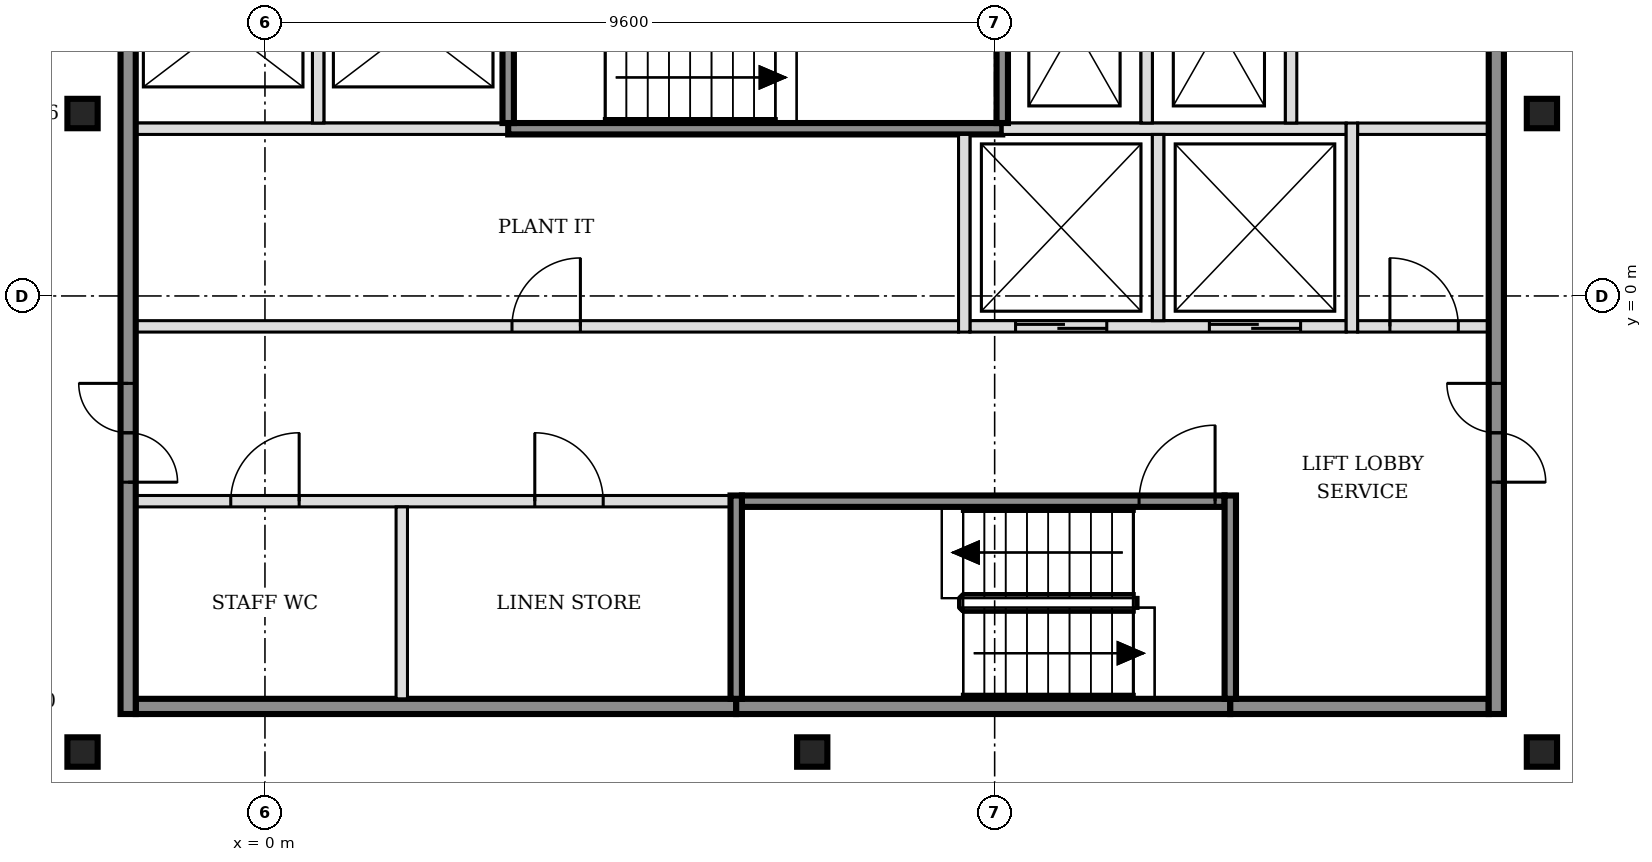
"""IFC4 building model, lengths in metres.
Left out: names, types, materials, properties, quantities, classifications, styles, units other than length and angle.
Written with IfcOpenShell. Run it as: python <this file> out.ifc"""

import sys

from ifc_helpers import new_model, si_unit, direction, frame, frame_2d, origin, origin_2d, place, context, subcontext, project, spatial, rectangle, i_section, extrude, element, fill, save


model = new_model("IFC4")
c1 = context("Model", 3, precision=1e-05, world=origin(), true_north=direction((0.0, 1.0)))
c2 = subcontext(c1, "Body", "Model", "MODEL_VIEW")
j1 = project(units=[si_unit("LENGTHUNIT", "METRE"), si_unit("PLANEANGLEUNIT", "RADIAN")], contexts=[c1])
p1 = place(None, origin())
s1 = spatial("IfcSite", under=j1, at=p1, CompositionType="ELEMENT")
p2 = place(p1, origin())
s2 = spatial("IfcBuilding", under=s1, at=p2, CompositionType="ELEMENT")
p3 = place(p2, frame((0.0, 0.0, 261.0)))
s3 = spatial("IfcBuildingStorey", under=s2, at=p3, CompositionType="ELEMENT", Elevation=261.0)
for number, where, z_axis, x_axis in (
    (1, (-2.4, -6.0, -0.25), (0.0, 0.0, 1.0), (1.0, 0.0, 0.0)),
    (2, (7.2, -6.0, -0.25), (0.0, 0.0, 1.0), (1.0, 0.0, 0.0)),
    (3, (16.8, -6.0, -0.25), (0.0, 0.0, 1.0), (1.0, 0.0, 0.0)),
    (4, (-2.4, 2.4, -0.25), (0.0, 0.0, 1.0), (1.0, 0.0, 0.0)),
    (5, (16.8, 2.4, -0.25), (0.0, 0.0, 1.0), (1.0, 0.0, 0.0)),
):
    element("IfcColumn", number, at=place(p3, frame(where, z_axis=z_axis, x_axis=x_axis)), inside=s3, PredefinedType="COLUMN", context=c2, shape_type="SweptSolid", body=[
        extrude(i_section(OverallWidth=0.398, OverallDepth=0.387, WebThickness=0.021, FlangeThickness=0.033, FilletRadius=0.015, at=origin_2d()), origin(), (0.0, 0.0, 1.0), 6.1),
    ])
p4 = place(p3, frame((-1.7, -5.4, 0.0), z_axis=(0.0, 0.0, 1.0), x_axis=(1.0, 0.0, 0.0)))
e6 = element("IfcWall", 6, at=p4, inside=s3, PredefinedType="SOLIDWALL", context=c2, shape_type="SweptSolid", body=[
    extrude(rectangle(XDim=7.9, YDim=0.2, at=frame_2d((3.95, 0.0))), origin(), (0.0, 0.0, 1.0), 5.85),
])
p5 = place(p3, frame((6.2, -5.4, 0.0), z_axis=(0.0, 0.0, 1.0), x_axis=(1.0, 0.0, 0.0)))
e7 = element("IfcWall", 7, at=p5, inside=s3, PredefinedType="SOLIDWALL", context=c2, shape_type="SweptSolid", body=[
    extrude(rectangle(XDim=6.5, YDim=0.2, at=frame_2d((3.25, 0.0))), origin(), (0.0, 0.0, 1.0), 5.85),
])
p6 = place(p3, frame((12.7, -5.4, 0.0), z_axis=(0.0, 0.0, 1.0), x_axis=(1.0, 0.0, 0.0)))
e8 = element("IfcWall", 8, at=p6, inside=s3, PredefinedType="SOLIDWALL", context=c2, shape_type="SweptSolid", body=[
    extrude(rectangle(XDim=3.4, YDim=0.2, at=frame_2d((1.7, 0.0))), origin(), (0.0, 0.0, 1.0), 5.85),
])
p7 = place(p3, frame((-1.7, -2.7, 0.0), z_axis=(0.0, 0.0, 1.0), x_axis=(1.0, 0.0, 0.0)))
e9 = element("IfcWall", 9, at=p7, inside=s3, PredefinedType="PARTITIONING", context=c2, shape_type="SweptSolid", body=[
    extrude(rectangle(XDim=7.825, YDim=0.15, at=frame_2d((3.913, 0.0))), origin(), (0.0, 0.0, 1.0), 5.85),
])
p8 = place(p7, frame((1.25, 0.0, 0.0)))
e10 = element("IfcOpeningElement", 10, at=p8, cuts=e9, PredefinedType="OPENING", context=c2, shape_type="SweptSolid", body=[
    extrude(rectangle(XDim=0.9, YDim=2.1, at=frame_2d((0.45, 1.05))), frame((0.0, 0.085, 0.0), z_axis=(0.0, -1.0, 0.0), x_axis=(1.0, 0.0, 0.0)), (0.0, 0.0, 1.0), 0.17),
])
p9 = place(p7, frame((5.25, 0.0, 0.0)))
e11 = element("IfcOpeningElement", 11, at=p9, cuts=e9, PredefinedType="OPENING", context=c2, shape_type="SweptSolid", body=[
    extrude(rectangle(XDim=0.9, YDim=2.1, at=frame_2d((0.45, 1.05))), frame((0.0, 0.085, 0.0), z_axis=(0.0, -1.0, 0.0), x_axis=(1.0, 0.0, 0.0)), (0.0, 0.0, 1.0), 0.17),
])
p10 = place(p3, frame((6.275, -2.7, 0.0), z_axis=(0.0, 0.0, 1.0), x_axis=(1.0, 0.0, 0.0)))
e12 = element("IfcWall", 12, at=p10, inside=s3, PredefinedType="SOLIDWALL", context=c2, shape_type="SweptSolid", body=[
    extrude(rectangle(XDim=6.35, YDim=0.15, at=frame_2d((3.175, 0.0))), origin(), (0.0, 0.0, 1.0), 5.85),
])
p11 = place(p10, frame((5.225, 0.0, 0.0)))
e13 = element("IfcOpeningElement", 13, at=p11, cuts=e12, PredefinedType="OPENING", context=c2, shape_type="SweptSolid", body=[
    extrude(rectangle(XDim=1.0, YDim=2.1, at=frame_2d((0.5, 1.05))), frame((0.0, 0.085, 0.0), z_axis=(0.0, -1.0, 0.0), x_axis=(1.0, 0.0, 0.0)), (0.0, 0.0, 1.0), 0.17),
])
p12 = place(p3, frame((-1.7, -0.4, 0.0), z_axis=(0.0, 0.0, 1.0), x_axis=(1.0, 0.0, 0.0)))
e14 = element("IfcWall", 14, at=p12, inside=s3, PredefinedType="PARTITIONING", context=c2, shape_type="SweptSolid", body=[
    extrude(rectangle(XDim=10.825, YDim=0.15, at=frame_2d((5.413, 0.0))), origin(), (0.0, 0.0, 1.0), 5.85),
])
p13 = place(p12, frame((4.95, 0.0, 0.0)))
e15 = element("IfcOpeningElement", 15, at=p13, cuts=e14, PredefinedType="OPENING", context=c2, shape_type="SweptSolid", body=[
    extrude(rectangle(XDim=0.9, YDim=2.1, at=frame_2d((0.45, 1.05))), frame((0.0, 0.085, 0.0), z_axis=(0.0, -1.0, 0.0), x_axis=(1.0, 0.0, 0.0)), (0.0, 0.0, 1.0), 0.17),
])
p14 = place(p3, frame((9.275, -0.4, 0.0), z_axis=(0.0, 0.0, 1.0), x_axis=(1.0, 0.0, 0.0)))
e16 = element("IfcWall", 16, at=p14, inside=s3, PredefinedType="SOLIDWALL", context=c2, shape_type="SweptSolid", body=[
    extrude(rectangle(XDim=4.95, YDim=0.15, at=frame_2d((2.475, 0.0))), origin(), (0.0, 0.0, 1.0), 5.85),
])
p15 = place(p14, frame((0.6, 0.0, 0.0)))
e17 = element("IfcOpeningElement", 17, at=p15, cuts=e16, PredefinedType="OPENING", context=c2, shape_type="SweptSolid", body=[
    extrude(rectangle(XDim=1.2, YDim=2.1, at=frame_2d((0.6, 1.05))), frame((0.0, 0.085, 0.0), z_axis=(0.0, -1.0, 0.0), x_axis=(1.0, 0.0, 0.0)), (0.0, 0.0, 1.0), 0.17),
])
p16 = place(p14, frame((3.15, 0.0, 0.0)))
e18 = element("IfcOpeningElement", 18, at=p16, cuts=e16, PredefinedType="OPENING", context=c2, shape_type="SweptSolid", body=[
    extrude(rectangle(XDim=1.2, YDim=2.1, at=frame_2d((0.6, 1.05))), frame((0.0, 0.085, 0.0), z_axis=(0.0, -1.0, 0.0), x_axis=(1.0, 0.0, 0.0)), (0.0, 0.0, 1.0), 0.17),
])
p17 = place(p3, frame((14.375, -0.4, 0.0), z_axis=(0.0, 0.0, 1.0), x_axis=(1.0, 0.0, 0.0)))
e19 = element("IfcWall", 19, at=p17, inside=s3, PredefinedType="PARTITIONING", context=c2, shape_type="SweptSolid", body=[
    extrude(rectangle(XDim=1.725, YDim=0.15, at=frame_2d((0.863, 0.0))), origin(), (0.0, 0.0, 1.0), 5.85),
])
p18 = place(p17, frame((0.425, 0.0, 0.0)))
e20 = element("IfcOpeningElement", 20, at=p18, cuts=e19, PredefinedType="OPENING", context=c2, shape_type="SweptSolid", body=[
    extrude(rectangle(XDim=0.9, YDim=2.1, at=frame_2d((0.45, 1.05))), frame((0.0, 0.085, 0.0), z_axis=(0.0, -1.0, 0.0), x_axis=(1.0, 0.0, 0.0)), (0.0, 0.0, 1.0), 0.17),
])
p19 = place(p3, frame((-1.7, 2.2, 0.0), z_axis=(0.0, 0.0, 1.0), x_axis=(1.0, 0.0, 0.0)))
e21 = element("IfcWall", 21, at=p19, inside=s3, PredefinedType="SOLIDWALL", context=c2, shape_type="SweptSolid", body=[
    extrude(rectangle(XDim=4.9, YDim=0.15, at=frame_2d((2.45, 0.0))), origin(), (0.0, 0.0, 1.0), 5.85),
])
p20 = place(p3, frame((3.2, 2.2, 0.0), z_axis=(0.0, 0.0, 1.0), x_axis=(1.0, 0.0, 0.0)))
e22 = element("IfcWall", 22, at=p20, inside=s3, PredefinedType="SOLIDWALL", context=c2, shape_type="SweptSolid", body=[
    extrude(rectangle(XDim=6.5, YDim=0.15, at=frame_2d((3.25, 0.0))), origin(), (0.0, 0.0, 1.0), 5.85),
])
p21 = place(p3, frame((9.7, 2.2, 0.0), z_axis=(0.0, 0.0, 1.0), x_axis=(1.0, 0.0, 0.0)))
e23 = element("IfcWall", 23, at=p21, inside=s3, PredefinedType="SOLIDWALL", context=c2, shape_type="SweptSolid", body=[
    extrude(rectangle(XDim=4.525, YDim=0.15, at=frame_2d((2.263, 0.0))), origin(), (0.0, 0.0, 1.0), 5.85),
])
p22 = place(p3, frame((14.375, 2.2, 0.0), z_axis=(0.0, 0.0, 1.0), x_axis=(1.0, 0.0, 0.0)))
e24 = element("IfcWall", 24, at=p22, inside=s3, PredefinedType="PARTITIONING", context=c2, shape_type="SweptSolid", body=[
    extrude(rectangle(XDim=1.725, YDim=0.15, at=frame_2d((0.863, 0.0))), origin(), (0.0, 0.0, 1.0), 5.85),
])
p23 = place(p3, frame((-1.8, -5.5, 0.0), z_axis=(0.0, 0.0, 1.0), x_axis=(0.0, 1.0, 0.0)))
e25 = element("IfcWall", 25, at=p23, inside=s3, PredefinedType="SOLIDWALL", context=c2, shape_type="SweptSolid", body=[
    extrude(rectangle(XDim=15.8, YDim=0.2, at=frame_2d((7.9, 0.0))), origin(), (0.0, 0.0, 1.0), 5.85),
])
p24 = place(p23, frame((3.05, 0.0, 0.0)))
e26 = element("IfcOpeningElement", 26, at=p24, cuts=e25, PredefinedType="OPENING", context=c2, shape_type="SweptSolid", body=[
    extrude(rectangle(XDim=1.3, YDim=2.1, at=frame_2d((0.65, 1.05))), frame((0.0, 0.11, 0.0), z_axis=(0.0, -1.0, 0.0), x_axis=(1.0, 0.0, 0.0)), (0.0, 0.0, 1.0), 0.22),
])
p25 = place(p23, frame((11.45, 0.0, 0.0)))
e27 = element("IfcOpeningElement", 27, at=p25, cuts=e25, PredefinedType="OPENING", context=c2, shape_type="SweptSolid", body=[
    extrude(rectangle(XDim=1.3, YDim=2.1, at=frame_2d((0.65, 1.05))), frame((0.0, 0.11, 0.0), z_axis=(0.0, -1.0, 0.0), x_axis=(1.0, 0.0, 0.0)), (0.0, 0.0, 1.0), 0.22),
])
p26 = place(p3, frame((0.7, 2.275, 0.0), z_axis=(0.0, 0.0, 1.0), x_axis=(0.0, 1.0, 0.0)))
e28 = element("IfcWall", 28, at=p26, inside=s3, PredefinedType="SOLIDWALL", context=c2, shape_type="SweptSolid", body=[
    extrude(rectangle(XDim=2.55, YDim=0.15, at=frame_2d((1.275, 0.0))), origin(), (0.0, 0.0, 1.0), 5.85),
])
p27 = place(p3, frame((1.8, -5.3, 0.0), z_axis=(0.0, 0.0, 1.0), x_axis=(0.0, 1.0, 0.0)))
e29 = element("IfcWall", 29, at=p27, inside=s3, PredefinedType="PARTITIONING", context=c2, shape_type="SweptSolid", body=[
    extrude(rectangle(XDim=2.525, YDim=0.15, at=frame_2d((1.263, 0.0))), origin(), (0.0, 0.0, 1.0), 5.85),
])
p28 = place(p3, frame((3.2, 2.275, 0.0), z_axis=(0.0, 0.0, 1.0), x_axis=(0.0, 1.0, 0.0)))
e30 = element("IfcWall", 30, at=p28, inside=s3, PredefinedType="SOLIDWALL", context=c2, shape_type="SweptSolid", body=[
    extrude(rectangle(XDim=2.55, YDim=0.15, at=frame_2d((1.275, 0.0))), origin(), (0.0, 0.0, 1.0), 5.85),
])
p29 = place(p3, frame((6.2, -5.3, 0.0), z_axis=(0.0, 0.0, 1.0), x_axis=(0.0, 1.0, 0.0)))
e31 = element("IfcWall", 31, at=p29, inside=s3, PredefinedType="SOLIDWALL", context=c2, shape_type="SweptSolid", body=[
    extrude(rectangle(XDim=2.675, YDim=0.15, at=frame_2d((1.337, 0.0))), origin(), (0.0, 0.0, 1.0), 5.85),
])
p30 = place(p3, frame((9.2, -0.475, 0.0), z_axis=(0.0, 0.0, 1.0), x_axis=(0.0, 1.0, 0.0)))
e32 = element("IfcWall", 32, at=p30, inside=s3, PredefinedType="SOLIDWALL", context=c2, shape_type="SweptSolid", body=[
    extrude(rectangle(XDim=2.6, YDim=0.15, at=frame_2d((1.3, 0.0))), origin(), (0.0, 0.0, 1.0), 5.85),
])
for number, where, z_axis, x_axis in (
    (33, (9.7, 2.275, 0.0), (0.0, 0.0, 1.0), (0.0, 1.0, 0.0)),
    (34, (11.6, 2.275, 0.0), (0.0, 0.0, 1.0), (0.0, 1.0, 0.0)),
):
    element("IfcWall", number, at=place(p3, frame(where, z_axis=z_axis, x_axis=x_axis)), inside=s3, PredefinedType="SOLIDWALL", context=c2, shape_type="SweptSolid", body=[
        extrude(rectangle(XDim=2.55, YDim=0.15, at=frame_2d((1.275, 0.0))), origin(), (0.0, 0.0, 1.0), 5.85),
    ])
p31 = place(p3, frame((11.75, -0.325, 0.0), z_axis=(0.0, 0.0, 1.0), x_axis=(0.0, 1.0, 0.0)))
e35 = element("IfcWall", 35, at=p31, inside=s3, PredefinedType="SOLIDWALL", context=c2, shape_type="SweptSolid", body=[
    extrude(rectangle(XDim=2.45, YDim=0.15, at=frame_2d((1.225, 0.0))), origin(), (0.0, 0.0, 1.0), 5.85),
])
p32 = place(p3, frame((12.7, -5.3, 0.0), z_axis=(0.0, 0.0, 1.0), x_axis=(0.0, 1.0, 0.0)))
e36 = element("IfcWall", 36, at=p32, inside=s3, PredefinedType="SOLIDWALL", context=c2, shape_type="SweptSolid", body=[
    extrude(rectangle(XDim=2.675, YDim=0.15, at=frame_2d((1.337, 0.0))), origin(), (0.0, 0.0, 1.0), 5.85),
])
p33 = place(p3, frame((13.5, 2.275, 0.0), z_axis=(0.0, 0.0, 1.0), x_axis=(0.0, 1.0, 0.0)))
e37 = element("IfcWall", 37, at=p33, inside=s3, PredefinedType="SOLIDWALL", context=c2, shape_type="SweptSolid", body=[
    extrude(rectangle(XDim=2.55, YDim=0.15, at=frame_2d((1.275, 0.0))), origin(), (0.0, 0.0, 1.0), 5.85),
])
p34 = place(p3, frame((14.3, -0.475, 0.0), z_axis=(0.0, 0.0, 1.0), x_axis=(0.0, 1.0, 0.0)))
e38 = element("IfcWall", 38, at=p34, inside=s3, PredefinedType="SOLIDWALL", context=c2, shape_type="SweptSolid", body=[
    extrude(rectangle(XDim=2.75, YDim=0.15, at=frame_2d((1.375, 0.0))), origin(), (0.0, 0.0, 1.0), 5.85),
])
p35 = place(p3, frame((16.2, -5.5, 0.0), z_axis=(0.0, 0.0, 1.0), x_axis=(0.0, 1.0, 0.0)))
e39 = element("IfcWall", 39, at=p35, inside=s3, PredefinedType="SOLIDWALL", context=c2, shape_type="SweptSolid", body=[
    extrude(rectangle(XDim=15.8, YDim=0.2, at=frame_2d((7.9, 0.0))), origin(), (0.0, 0.0, 1.0), 5.85),
])
p36 = place(p35, frame((3.05, 0.0, 0.0)))
e40 = element("IfcOpeningElement", 40, at=p36, cuts=e39, PredefinedType="OPENING", context=c2, shape_type="SweptSolid", body=[
    extrude(rectangle(XDim=1.3, YDim=2.1, at=frame_2d((0.65, 1.05))), frame((0.0, 0.11, 0.0), z_axis=(0.0, -1.0, 0.0), x_axis=(1.0, 0.0, 0.0)), (0.0, 0.0, 1.0), 0.22),
])
p37 = place(p35, frame((11.45, 0.0, 0.0)))
e41 = element("IfcOpeningElement", 41, at=p37, cuts=e39, PredefinedType="OPENING", context=c2, shape_type="SweptSolid", body=[
    extrude(rectangle(XDim=1.3, YDim=2.1, at=frame_2d((0.65, 1.05))), frame((0.0, 0.11, 0.0), z_axis=(0.0, -1.0, 0.0), x_axis=(1.0, 0.0, 0.0)), (0.0, 0.0, 1.0), 0.22),
])
p38 = place(p15, origin())
e42 = element("IfcDoor", 42, at=p38, inside=s3, OperationType="DOUBLE_DOOR_SLIDING", PredefinedType="DOOR", context=c2, shape_type="SweptSolid", body=[
    extrude(rectangle(XDim=1.2, YDim=2.1, at=frame_2d((0.6, 1.05))), frame((0.0, 0.025, 0.0), z_axis=(0.0, -1.0, 0.0), x_axis=(1.0, 0.0, 0.0)), (0.0, 0.0, 1.0), 0.05),
])
fill(e17, e42)
p39 = place(p16, origin())
e43 = element("IfcDoor", 43, at=p39, inside=s3, OperationType="DOUBLE_DOOR_SLIDING", PredefinedType="DOOR", context=c2, shape_type="SweptSolid", body=[
    extrude(rectangle(XDim=1.2, YDim=2.1, at=frame_2d((0.6, 1.05))), frame((0.0, 0.025, 0.0), z_axis=(0.0, -1.0, 0.0), x_axis=(1.0, 0.0, 0.0)), (0.0, 0.0, 1.0), 0.05),
])
fill(e18, e43)
p40 = place(p11, origin())
e44 = element("IfcDoor", 44, at=p40, inside=s3, OperationType="SINGLE_SWING_RIGHT", PredefinedType="DOOR", context=c2, shape_type="SweptSolid", body=[
    extrude(rectangle(XDim=1.0, YDim=2.1, at=frame_2d((0.5, 1.05))), frame((0.0, 0.025, 0.0), z_axis=(0.0, -1.0, 0.0), x_axis=(1.0, 0.0, 0.0)), (0.0, 0.0, 1.0), 0.05),
])
fill(e13, e44)
p41 = place(p24, origin())
e45 = element("IfcDoor", 45, at=p41, inside=s3, OperationType="DOUBLE_DOOR_SINGLE_SWING", PredefinedType="DOOR", context=c2, shape_type="SweptSolid", body=[
    extrude(rectangle(XDim=1.3, YDim=2.1, at=frame_2d((0.65, 1.05))), frame((0.0, 0.025, 0.0), z_axis=(0.0, -1.0, 0.0), x_axis=(1.0, 0.0, 0.0)), (0.0, 0.0, 1.0), 0.05),
])
fill(e26, e45)
p42 = place(p36, origin())
e46 = element("IfcDoor", 46, at=p42, inside=s3, OperationType="DOUBLE_DOOR_SINGLE_SWING", PredefinedType="DOOR", context=c2, shape_type="SweptSolid", body=[
    extrude(rectangle(XDim=1.3, YDim=2.1, at=frame_2d((0.65, 1.05))), frame((0.0, 0.025, 0.0), z_axis=(0.0, -1.0, 0.0), x_axis=(1.0, 0.0, 0.0)), (0.0, 0.0, 1.0), 0.05),
])
fill(e40, e46)
p43 = place(p18, origin())
e47 = element("IfcDoor", 47, at=p43, inside=s3, OperationType="SINGLE_SWING_LEFT", PredefinedType="DOOR", context=c2, shape_type="SweptSolid", body=[
    extrude(rectangle(XDim=0.9, YDim=2.1, at=frame_2d((0.45, 1.05))), frame((0.0, 0.025, 0.0), z_axis=(0.0, -1.0, 0.0), x_axis=(1.0, 0.0, 0.0)), (0.0, 0.0, 1.0), 0.05),
])
fill(e20, e47)
p44 = place(p8, origin())
e48 = element("IfcDoor", 48, at=p44, inside=s3, OperationType="SINGLE_SWING_RIGHT", PredefinedType="DOOR", context=c2, shape_type="SweptSolid", body=[
    extrude(rectangle(XDim=0.9, YDim=2.1, at=frame_2d((0.45, 1.05))), frame((0.0, 0.025, 0.0), z_axis=(0.0, -1.0, 0.0), x_axis=(1.0, 0.0, 0.0)), (0.0, 0.0, 1.0), 0.05),
])
fill(e10, e48)
p45 = place(p9, origin())
e49 = element("IfcDoor", 49, at=p45, inside=s3, OperationType="SINGLE_SWING_LEFT", PredefinedType="DOOR", context=c2, shape_type="SweptSolid", body=[
    extrude(rectangle(XDim=0.9, YDim=2.1, at=frame_2d((0.45, 1.05))), frame((0.0, 0.025, 0.0), z_axis=(0.0, -1.0, 0.0), x_axis=(1.0, 0.0, 0.0)), (0.0, 0.0, 1.0), 0.05),
])
fill(e11, e49)
p46 = place(p13, origin())
e50 = element("IfcDoor", 50, at=p46, inside=s3, OperationType="SINGLE_SWING_RIGHT", PredefinedType="DOOR", context=c2, shape_type="SweptSolid", body=[
    extrude(rectangle(XDim=0.9, YDim=2.1, at=frame_2d((0.45, 1.05))), frame((0.0, 0.025, 0.0), z_axis=(0.0, -1.0, 0.0), x_axis=(1.0, 0.0, 0.0)), (0.0, 0.0, 1.0), 0.05),
])
fill(e15, e50)
save(model, sys.argv[1])
